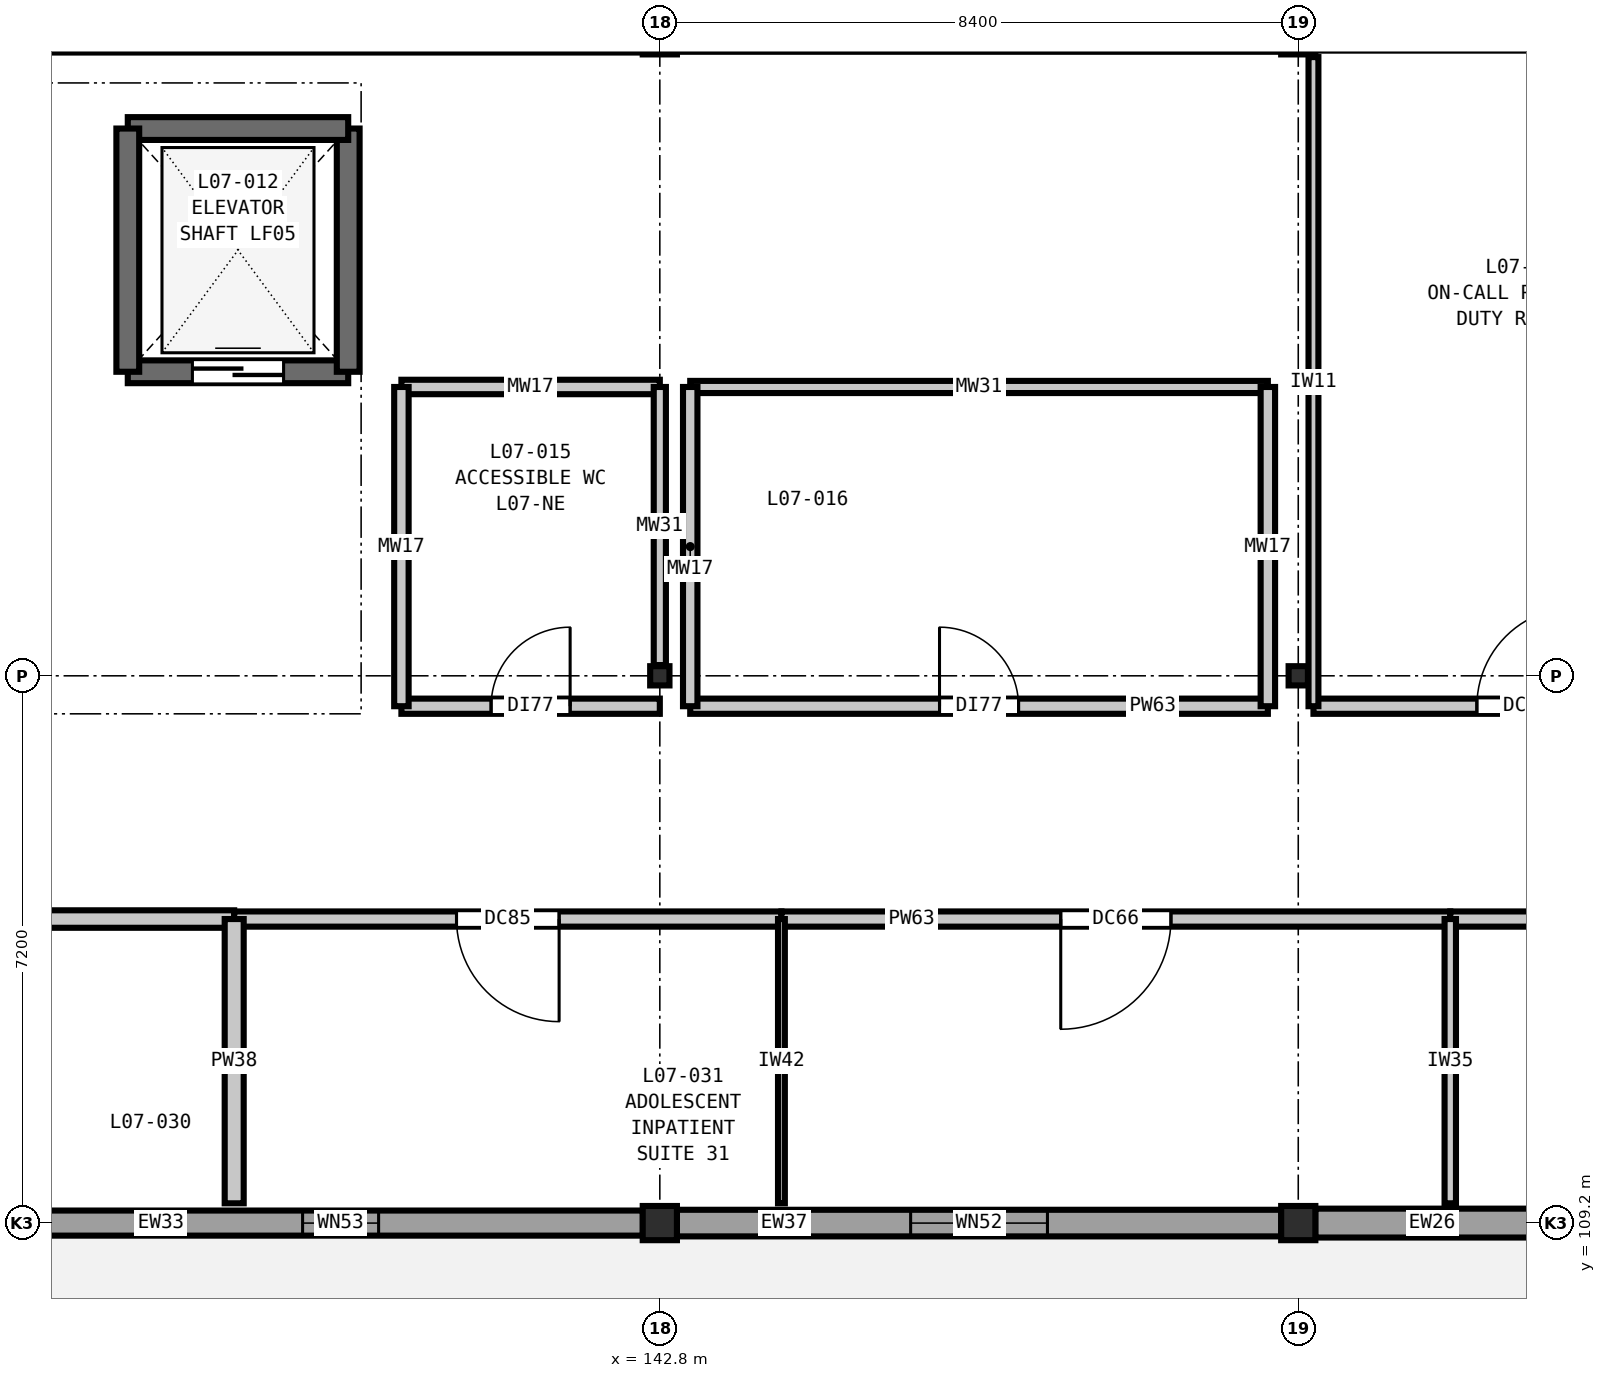
"""IFC4 building model, lengths in metres.
Left out: names, types, materials, properties, quantities, classifications, styles, units other than length and angle.
Written with IfcOpenShell. Run it as: python <this file> out.ifc"""

import sys

from ifc_helpers import new_model, si_unit, direction, frame, frame_2d, origin, origin_2d, place, context, subcontext, project, spatial, rectangle, i_section, extrude, element, fill, save


model = new_model("IFC4")
c1 = context("Model", 3, precision=1e-05, world=origin(), true_north=direction((0.0, 1.0)))
c2 = subcontext(c1, "Body", "Model", "MODEL_VIEW")
j1 = project(units=[si_unit("LENGTHUNIT", "METRE"), si_unit("PLANEANGLEUNIT", "RADIAN")], contexts=[c1])
p1 = place(None, origin())
s1 = spatial("IfcSite", under=j1, at=p1, CompositionType="ELEMENT")
p2 = place(p1, origin())
s2 = spatial("IfcBuilding", under=s1, at=p2, CompositionType="ELEMENT")
p3 = place(p2, frame((0.0, 0.0, 33.0)))
s3 = spatial("IfcBuildingStorey", under=s2, at=p3, CompositionType="ELEMENT", Elevation=33.0)
p4 = place(p3, frame((142.8, 109.2, 0.0), z_axis=(0.0, 0.0, 1.0), x_axis=(1.0, 0.0, 0.0)))
e1 = element("IfcColumn", 1, at=p4, inside=s3, PredefinedType="COLUMN", context=c2, shape_type="SweptSolid", body=[
    extrude(rectangle(XDim=0.45, YDim=0.45, at=origin_2d()), origin(), (0.0, 0.0, 1.0), 4.2),
])
p5 = place(p3, frame((142.8, 116.4, 0.0), z_axis=(0.0, 0.0, 1.0), x_axis=(1.0, 0.0, 0.0)))
e2 = element("IfcColumn", 2, at=p5, inside=s3, PredefinedType="COLUMN", context=c2, shape_type="SweptSolid", body=[
    extrude(i_section(OverallWidth=0.254, OverallDepth=0.253, WebThickness=0.009, FlangeThickness=0.014, FilletRadius=0.013, at=origin_2d()), origin(), (0.0, 0.0, 1.0), 4.2),
])
for number, where, z_axis, x_axis in (
    (3, (142.8, 124.8, 0.0), (0.0, 0.0, 1.0), (1.0, 0.0, 0.0)),
    (4, (151.2, 109.2, 0.0), (0.0, 0.0, 1.0), (1.0, 0.0, 0.0)),
):
    element("IfcColumn", number, at=place(p3, frame(where, z_axis=z_axis, x_axis=x_axis)), inside=s3, PredefinedType="COLUMN", context=c2, shape_type="SweptSolid", body=[
        extrude(rectangle(XDim=0.45, YDim=0.45, at=origin_2d()), origin(), (0.0, 0.0, 1.0), 4.2),
    ])
p6 = place(p3, frame((151.2, 116.4, 0.0), z_axis=(0.0, 0.0, 1.0), x_axis=(1.0, 0.0, 0.0)))
e5 = element("IfcColumn", 5, at=p6, inside=s3, PredefinedType="COLUMN", context=c2, shape_type="SweptSolid", body=[
    extrude(i_section(OverallWidth=0.254, OverallDepth=0.253, WebThickness=0.009, FlangeThickness=0.014, FilletRadius=0.013, at=origin_2d()), origin(), (0.0, 0.0, 1.0), 4.2),
])
p7 = place(p3, frame((151.2, 124.8, 0.0), z_axis=(0.0, 0.0, 1.0), x_axis=(1.0, 0.0, 0.0)))
e6 = element("IfcColumn", 6, at=p7, inside=s3, PredefinedType="COLUMN", context=c2, shape_type="SweptSolid", body=[
    extrude(rectangle(XDim=0.45, YDim=0.45, at=origin_2d()), origin(), (0.0, 0.0, 1.0), 4.2),
])
p8 = place(p3, frame((159.377, 109.2, 0.0), z_axis=(0.0, 0.0, 1.0), x_axis=(-1.0, 0.0, 0.0)))
e7 = element("IfcWall", 7, at=p8, inside=s3, PredefinedType="SOLIDWALL", context=c2, shape_type="SweptSolid", body=[
    extrude(rectangle(XDim=7.954, YDim=0.38, at=frame_2d((3.977, 0.0))), origin(), (0.0, 0.0, 1.0), 3.48),
])
p9 = place(p8, frame((3.327, 0.0, 0.0)))
e8 = element("IfcOpeningElement", 8, at=p9, cuts=e7, PredefinedType="OPENING", context=c2, shape_type="SweptSolid", body=[
    extrude(rectangle(XDim=1.3, YDim=2.15, at=frame_2d((0.65, 1.075))), frame((0.0, 0.2, 0.0), z_axis=(0.0, -1.0, 0.0), x_axis=(1.0, 0.0, 0.0)), (0.0, 0.0, 1.0), 0.4),
])
p10 = place(p3, frame((150.977, 109.2, 0.0), z_axis=(0.0, 0.0, 1.0), x_axis=(-1.0, 0.0, 0.0)))
e9 = element("IfcWall", 9, at=p10, inside=s3, PredefinedType="SOLIDWALL", context=c2, shape_type="SweptSolid", body=[
    extrude(rectangle(XDim=7.954, YDim=0.35, at=frame_2d((3.977, 0.0))), origin(), (0.0, 0.0, 1.0), 3.48),
])
p11 = place(p10, frame((3.077, 0.0, 0.9)))
e10 = element("IfcOpeningElement", 10, at=p11, cuts=e9, PredefinedType="OPENING", context=c2, shape_type="SweptSolid", body=[
    extrude(rectangle(XDim=1.8, YDim=1.55, at=frame_2d((0.9, 0.775))), frame((0.0, 0.185, 0.0), z_axis=(0.0, -1.0, 0.0), x_axis=(1.0, 0.0, 0.0)), (0.0, 0.0, 1.0), 0.37),
])
p12 = place(p3, frame((142.577, 109.2, 0.0), z_axis=(0.0, 0.0, 1.0), x_axis=(-1.0, 0.0, 0.0)))
e11 = element("IfcWall", 11, at=p12, inside=s3, PredefinedType="SOLIDWALL", context=c2, shape_type="SweptSolid", body=[
    extrude(rectangle(XDim=7.954, YDim=0.33, at=frame_2d((3.977, 0.0))), origin(), (0.0, 0.0, 1.0), 3.48),
])
p13 = place(p12, frame((3.477, 0.0, 0.9)))
e12 = element("IfcOpeningElement", 12, at=p13, cuts=e11, PredefinedType="OPENING", context=c2, shape_type="SweptSolid", body=[
    extrude(rectangle(XDim=1.0, YDim=1.75, at=frame_2d((0.5, 0.875))), frame((0.0, 0.175, 0.0), z_axis=(0.0, -1.0, 0.0), x_axis=(1.0, 0.0, 0.0)), (0.0, 0.0, 1.0), 0.35),
])
p14 = place(p3, frame((135.8, 120.4, 0.0), z_axis=(0.0, 0.0, 1.0), x_axis=(1.0, 0.0, 0.0)))
e13 = element("IfcWall", 13, at=p14, inside=s3, PredefinedType="SHEAR", context=c2, shape_type="SweptSolid", body=[
    extrude(rectangle(XDim=2.9, YDim=0.3, at=frame_2d((1.45, 0.0))), origin(), (0.0, 0.0, 1.0), 4.2),
])
p15 = place(p14, frame((0.85, 0.0, 0.0)))
e14 = element("IfcOpeningElement", 14, at=p15, cuts=e13, PredefinedType="OPENING", context=c2, shape_type="SweptSolid", body=[
    extrude(rectangle(XDim=1.2, YDim=2.2, at=frame_2d((0.6, 1.1))), frame((0.0, 0.16, 0.0), z_axis=(0.0, -1.0, 0.0), x_axis=(1.0, 0.0, 0.0)), (0.0, 0.0, 1.0), 0.32),
])
p16 = place(p3, frame((138.7, 120.4, 0.0), z_axis=(0.0, 0.0, 1.0), x_axis=(0.0, 1.0, 0.0)))
e15 = element("IfcWall", 15, at=p16, inside=s3, PredefinedType="SHEAR", context=c2, shape_type="SweptSolid", body=[
    extrude(rectangle(XDim=3.2, YDim=0.3, at=frame_2d((1.6, 0.0))), origin(), (0.0, 0.0, 1.0), 4.2),
])
p17 = place(p3, frame((138.7, 123.6, 0.0), z_axis=(0.0, 0.0, 1.0), x_axis=(-1.0, 0.0, 0.0)))
e16 = element("IfcWall", 16, at=p17, inside=s3, PredefinedType="SHEAR", context=c2, shape_type="SweptSolid", body=[
    extrude(rectangle(XDim=2.9, YDim=0.3, at=frame_2d((1.45, 0.0))), origin(), (0.0, 0.0, 1.0), 4.2),
])
p18 = place(p3, frame((135.8, 123.6, 0.0), z_axis=(0.0, 0.0, 1.0), x_axis=(0.0, -1.0, 0.0)))
e17 = element("IfcWall", 17, at=p18, inside=s3, PredefinedType="SHEAR", context=c2, shape_type="SweptSolid", body=[
    extrude(rectangle(XDim=3.2, YDim=0.3, at=frame_2d((1.6, 0.0))), origin(), (0.0, 0.0, 1.0), 4.2),
])
p19 = place(p3, frame((130.8, 113.2, 0.0), z_axis=(0.0, 0.0, 1.0), x_axis=(1.0, 0.0, 0.0)))
e18 = element("IfcWall", 18, at=p19, inside=s3, PredefinedType="PARTITIONING", context=c2, shape_type="SweptSolid", body=[
    extrude(rectangle(XDim=6.4, YDim=0.23, at=frame_2d((3.2, 0.0))), origin(), (0.0, 0.0, 1.0), 3.92),
])
p20 = place(p19, frame((2.55, 0.0, 0.0)))
e19 = element("IfcOpeningElement", 19, at=p20, cuts=e18, PredefinedType="OPENING", context=c2, shape_type="SweptSolid", body=[
    extrude(rectangle(XDim=1.3, YDim=2.2, at=frame_2d((0.65, 1.1))), frame((0.0, 0.125, 0.0), z_axis=(0.0, -1.0, 0.0), x_axis=(1.0, 0.0, 0.0)), (0.0, 0.0, 1.0), 0.25),
])
p21 = place(p3, frame((137.2, 113.2, 0.0), z_axis=(0.0, 0.0, 1.0), x_axis=(1.0, 0.0, 0.0)))
e20 = element("IfcWall", 20, at=p21, inside=s3, PredefinedType="PARTITIONING", context=c2, shape_type="SweptSolid", body=[
    extrude(rectangle(XDim=7.2, YDim=0.2, at=frame_2d((3.6, 0.0))), origin(), (0.0, 0.0, 1.0), 3.92),
])
p22 = place(p21, frame((2.925, 0.0, 0.0)))
e21 = element("IfcOpeningElement", 21, at=p22, cuts=e20, PredefinedType="OPENING", context=c2, shape_type="SweptSolid", body=[
    extrude(rectangle(XDim=1.35, YDim=2.2, at=frame_2d((0.675, 1.1))), frame((0.0, 0.11, 0.0), z_axis=(0.0, -1.0, 0.0), x_axis=(1.0, 0.0, 0.0)), (0.0, 0.0, 1.0), 0.22),
])
p23 = place(p3, frame((144.4, 113.2, 0.0), z_axis=(0.0, 0.0, 1.0), x_axis=(1.0, 0.0, 0.0)))
e22 = element("IfcWall", 22, at=p23, inside=s3, PredefinedType="PARTITIONING", context=c2, shape_type="SweptSolid", body=[
    extrude(rectangle(XDim=8.8, YDim=0.2, at=frame_2d((4.4, 0.0))), origin(), (0.0, 0.0, 1.0), 3.92),
])
p24 = place(p23, frame((3.675, 0.0, 0.0)))
e23 = element("IfcOpeningElement", 23, at=p24, cuts=e22, PredefinedType="OPENING", context=c2, shape_type="SweptSolid", body=[
    extrude(rectangle(XDim=1.45, YDim=2.25, at=frame_2d((0.725, 1.125))), frame((0.0, 0.11, 0.0), z_axis=(0.0, -1.0, 0.0), x_axis=(1.0, 0.0, 0.0)), (0.0, 0.0, 1.0), 0.22),
])
p25 = place(p3, frame((153.2, 113.2, 0.0), z_axis=(0.0, 0.0, 1.0), x_axis=(1.0, 0.0, 0.0)))
e24 = element("IfcWall", 24, at=p25, inside=s3, PredefinedType="PARTITIONING", context=c2, shape_type="SweptSolid", body=[
    extrude(rectangle(XDim=5.6, YDim=0.2, at=frame_2d((2.8, 0.0))), origin(), (0.0, 0.0, 1.0), 3.92),
])
p26 = place(p25, frame((2.025, 0.0, 0.0)))
e25 = element("IfcOpeningElement", 25, at=p26, cuts=e24, PredefinedType="OPENING", context=c2, shape_type="SweptSolid", body=[
    extrude(rectangle(XDim=1.55, YDim=2.25, at=frame_2d((0.775, 1.125))), frame((0.0, 0.11, 0.0), z_axis=(0.0, -1.0, 0.0), x_axis=(1.0, 0.0, 0.0)), (0.0, 0.0, 1.0), 0.22),
])
p27 = place(p3, frame((139.4, 116.0, 0.0), z_axis=(0.0, 0.0, 1.0), x_axis=(1.0, 0.0, 0.0)))
e26 = element("IfcWall", 26, at=p27, inside=s3, PredefinedType="PARTITIONING", context=c2, shape_type="SweptSolid", body=[
    extrude(rectangle(XDim=3.4, YDim=0.2, at=frame_2d((1.7, 0.0))), origin(), (0.0, 0.0, 1.0), 3.92),
])
p28 = place(p27, frame((1.18, 0.0, 0.0)))
e27 = element("IfcOpeningElement", 27, at=p28, cuts=e26, PredefinedType="OPENING", context=c2, shape_type="SweptSolid", body=[
    extrude(rectangle(XDim=1.04, YDim=2.1, at=frame_2d((0.52, 1.05))), frame((0.0, 0.11, 0.0), z_axis=(0.0, -1.0, 0.0), x_axis=(1.0, 0.0, 0.0)), (0.0, 0.0, 1.0), 0.22),
])
p29 = place(p3, frame((143.2, 116.0, 0.0), z_axis=(0.0, 0.0, 1.0), x_axis=(1.0, 0.0, 0.0)))
e28 = element("IfcWall", 28, at=p29, inside=s3, PredefinedType="PARTITIONING", context=c2, shape_type="SweptSolid", body=[
    extrude(rectangle(XDim=7.6, YDim=0.2, at=frame_2d((3.8, 0.0))), origin(), (0.0, 0.0, 1.0), 3.92),
])
p30 = place(p29, frame((3.28, 0.0, 0.0)))
e29 = element("IfcOpeningElement", 29, at=p30, cuts=e28, PredefinedType="OPENING", context=c2, shape_type="SweptSolid", body=[
    extrude(rectangle(XDim=1.04, YDim=2.1, at=frame_2d((0.52, 1.05))), frame((0.0, 0.11, 0.0), z_axis=(0.0, -1.0, 0.0), x_axis=(1.0, 0.0, 0.0)), (0.0, 0.0, 1.0), 0.22),
])
p31 = place(p3, frame((151.4, 116.0, 0.0), z_axis=(0.0, 0.0, 1.0), x_axis=(1.0, 0.0, 0.0)))
e30 = element("IfcWall", 30, at=p31, inside=s3, PredefinedType="PARTITIONING", context=c2, shape_type="SweptSolid", body=[
    extrude(rectangle(XDim=5.6, YDim=0.2, at=frame_2d((2.8, 0.0))), origin(), (0.0, 0.0, 1.0), 3.92),
])
p32 = place(p31, frame((2.15, 0.0, 0.0)))
e31 = element("IfcOpeningElement", 31, at=p32, cuts=e30, PredefinedType="OPENING", context=c2, shape_type="SweptSolid", body=[
    extrude(rectangle(XDim=1.3, YDim=2.2, at=frame_2d((0.65, 1.1))), frame((0.0, 0.11, 0.0), z_axis=(0.0, -1.0, 0.0), x_axis=(1.0, 0.0, 0.0)), (0.0, 0.0, 1.0), 0.22),
])
p33 = place(p3, frame((139.4, 120.2, 0.0), z_axis=(0.0, 0.0, 1.0), x_axis=(1.0, 0.0, 0.0)))
e32 = element("IfcWall", 32, at=p33, inside=s3, PredefinedType="PLUMBINGWALL", context=c2, shape_type="SweptSolid", body=[
    extrude(rectangle(XDim=3.4, YDim=0.19, at=frame_2d((1.7, 0.0))), origin(), (0.0, 0.0, 1.0), 3.92),
])
p34 = place(p3, frame((143.2, 120.2, 0.0), z_axis=(0.0, 0.0, 1.0), x_axis=(1.0, 0.0, 0.0)))
e33 = element("IfcWall", 33, at=p34, inside=s3, PredefinedType="PLUMBINGWALL", context=c2, shape_type="SweptSolid", body=[
    extrude(rectangle(XDim=7.6, YDim=0.16, at=frame_2d((3.8, 0.0))), origin(), (0.0, 0.0, 1.0), 3.92),
])
p35 = place(p3, frame((137.2, 109.46, 0.0), z_axis=(0.0, 0.0, 1.0), x_axis=(0.0, 1.0, 0.0)))
e34 = element("IfcWall", 34, at=p35, inside=s3, PredefinedType="PARTITIONING", context=c2, shape_type="SweptSolid", body=[
    extrude(rectangle(XDim=3.74, YDim=0.25, at=frame_2d((1.87, 0.0))), origin(), (0.0, 0.0, 1.0), 3.92),
])
p36 = place(p3, frame((139.4, 116.0, 0.0), z_axis=(0.0, 0.0, 1.0), x_axis=(0.0, 1.0, 0.0)))
e35 = element("IfcWall", 35, at=p36, inside=s3, PredefinedType="PLUMBINGWALL", context=c2, shape_type="SweptSolid", body=[
    extrude(rectangle(XDim=4.2, YDim=0.19, at=frame_2d((2.1, 0.0))), origin(), (0.0, 0.0, 1.0), 3.92),
])
p37 = place(p3, frame((142.8, 116.542, 0.0), z_axis=(0.0, 0.0, 1.0), x_axis=(0.0, 1.0, 0.0)))
e36 = element("IfcWall", 36, at=p37, inside=s3, PredefinedType="PLUMBINGWALL", context=c2, shape_type="SweptSolid", body=[
    extrude(rectangle(XDim=3.658, YDim=0.16, at=frame_2d((1.829, 0.0))), origin(), (0.0, 0.0, 1.0), 3.635),
])
p38 = place(p3, frame((143.2, 116.0, 0.0), z_axis=(0.0, 0.0, 1.0), x_axis=(0.0, 1.0, 0.0)))
e37 = element("IfcWall", 37, at=p38, inside=s3, PredefinedType="PLUMBINGWALL", context=c2, shape_type="SweptSolid", body=[
    extrude(rectangle(XDim=4.2, YDim=0.19, at=frame_2d((2.1, 0.0))), origin(), (0.0, 0.0, 1.0), 3.92),
])
p39 = place(p3, frame((144.4, 109.46, 0.0), z_axis=(0.0, 0.0, 1.0), x_axis=(0.0, 1.0, 0.0)))
e38 = element("IfcWall", 38, at=p39, inside=s3, PredefinedType="PARTITIONING", context=c2, shape_type="SweptSolid", body=[
    extrude(rectangle(XDim=3.74, YDim=0.09, at=frame_2d((1.87, 0.0))), origin(), (0.0, 0.0, 1.0), 3.92),
])
p40 = place(p3, frame((150.8, 116.0, 0.0), z_axis=(0.0, 0.0, 1.0), x_axis=(0.0, 1.0, 0.0)))
e39 = element("IfcWall", 39, at=p40, inside=s3, PredefinedType="PLUMBINGWALL", context=c2, shape_type="SweptSolid", body=[
    extrude(rectangle(XDim=4.2, YDim=0.19, at=frame_2d((2.1, 0.0))), origin(), (0.0, 0.0, 1.0), 3.92),
])
p41 = place(p3, frame((151.4, 116.0, 0.0), z_axis=(0.0, 0.0, 1.0), x_axis=(0.0, 1.0, 0.0)))
e40 = element("IfcWall", 40, at=p41, inside=s3, PredefinedType="PARTITIONING", context=c2, shape_type="SweptSolid", body=[
    extrude(rectangle(XDim=8.54, YDim=0.13, at=frame_2d((4.27, 0.0))), origin(), (0.0, 0.0, 1.0), 3.635),
])
p42 = place(p3, frame((153.2, 109.46, 0.0), z_axis=(0.0, 0.0, 1.0), x_axis=(0.0, 1.0, 0.0)))
e41 = element("IfcWall", 41, at=p42, inside=s3, PredefinedType="PARTITIONING", context=c2, shape_type="SweptSolid", body=[
    extrude(rectangle(XDim=3.74, YDim=0.15, at=frame_2d((1.87, 0.0))), origin(), (0.0, 0.0, 1.0), 3.92),
])
p43 = place(p11, origin())
e42 = element("IfcWindow", 42, at=p43, inside=s3, PartitioningType="DOUBLE_PANEL_VERTICAL", PredefinedType="WINDOW", context=c2, shape_type="SweptSolid", body=[
    extrude(rectangle(XDim=1.8, YDim=1.55, at=frame_2d((0.9, 0.775))), frame((0.0, 0.03, 0.0), z_axis=(0.0, -1.0, 0.0), x_axis=(1.0, 0.0, 0.0)), (0.0, 0.0, 1.0), 0.06),
])
fill(e10, e42)
p44 = place(p13, origin())
e43 = element("IfcWindow", 43, at=p44, inside=s3, PartitioningType="SINGLE_PANEL", PredefinedType="WINDOW", context=c2, shape_type="SweptSolid", body=[
    extrude(rectangle(XDim=1.0, YDim=1.75, at=frame_2d((0.5, 0.875))), frame((0.0, 0.03, 0.0), z_axis=(0.0, -1.0, 0.0), x_axis=(1.0, 0.0, 0.0)), (0.0, 0.0, 1.0), 0.06),
])
fill(e12, e43)
p45 = place(p15, origin())
e44 = element("IfcDoor", 44, at=p45, inside=s3, OperationType="DOUBLE_DOOR_SLIDING", PredefinedType="DOOR", context=c2, shape_type="SweptSolid", body=[
    extrude(rectangle(XDim=1.2, YDim=2.2, at=frame_2d((0.6, 1.1))), frame((0.0, 0.025, 0.0), z_axis=(0.0, -1.0, 0.0), x_axis=(1.0, 0.0, 0.0)), (0.0, 0.0, 1.0), 0.05),
])
fill(e14, e44)
p46 = place(p22, frame((1.35, 0.0, 0.0), z_axis=(0.0, 0.0, 1.0), x_axis=(-1.0, 0.0, 0.0)))
e45 = element("IfcDoor", 45, at=p46, inside=s3, OperationType="SINGLE_SWING_LEFT", PredefinedType="DOOR", context=c2, shape_type="SweptSolid", body=[
    extrude(rectangle(XDim=1.35, YDim=2.2, at=frame_2d((0.675, 1.1))), frame((0.0, 0.025, 0.0), z_axis=(0.0, -1.0, 0.0), x_axis=(1.0, 0.0, 0.0)), (0.0, 0.0, 1.0), 0.05),
])
fill(e21, e45)
p47 = place(p24, frame((1.45, 0.0, 0.0), z_axis=(0.0, 0.0, 1.0), x_axis=(-1.0, 0.0, 0.0)))
e46 = element("IfcDoor", 46, at=p47, inside=s3, OperationType="SINGLE_SWING_RIGHT", PredefinedType="DOOR", context=c2, shape_type="SweptSolid", body=[
    extrude(rectangle(XDim=1.45, YDim=2.25, at=frame_2d((0.725, 1.125))), frame((0.0, 0.025, 0.0), z_axis=(0.0, -1.0, 0.0), x_axis=(1.0, 0.0, 0.0)), (0.0, 0.0, 1.0), 0.05),
])
fill(e23, e46)
p48 = place(p28, origin())
e47 = element("IfcDoor", 47, at=p48, inside=s3, OperationType="SINGLE_SWING_RIGHT", PredefinedType="DOOR", context=c2, shape_type="SweptSolid", body=[
    extrude(rectangle(XDim=1.04, YDim=2.1, at=frame_2d((0.52, 1.05))), frame((0.0, 0.025, 0.0), z_axis=(0.0, -1.0, 0.0), x_axis=(1.0, 0.0, 0.0)), (0.0, 0.0, 1.0), 0.05),
])
fill(e27, e47)
p49 = place(p30, origin())
e48 = element("IfcDoor", 48, at=p49, inside=s3, OperationType="SINGLE_SWING_LEFT", PredefinedType="DOOR", context=c2, shape_type="SweptSolid", body=[
    extrude(rectangle(XDim=1.04, YDim=2.1, at=frame_2d((0.52, 1.05))), frame((0.0, 0.025, 0.0), z_axis=(0.0, -1.0, 0.0), x_axis=(1.0, 0.0, 0.0)), (0.0, 0.0, 1.0), 0.05),
])
fill(e29, e48)
p50 = place(p32, origin())
e49 = element("IfcDoor", 49, at=p50, inside=s3, OperationType="SINGLE_SWING_RIGHT", PredefinedType="DOOR", context=c2, shape_type="SweptSolid", body=[
    extrude(rectangle(XDim=1.3, YDim=2.2, at=frame_2d((0.65, 1.1))), frame((0.0, 0.025, 0.0), z_axis=(0.0, -1.0, 0.0), x_axis=(1.0, 0.0, 0.0)), (0.0, 0.0, 1.0), 0.05),
])
fill(e31, e49)
save(model, sys.argv[1])
